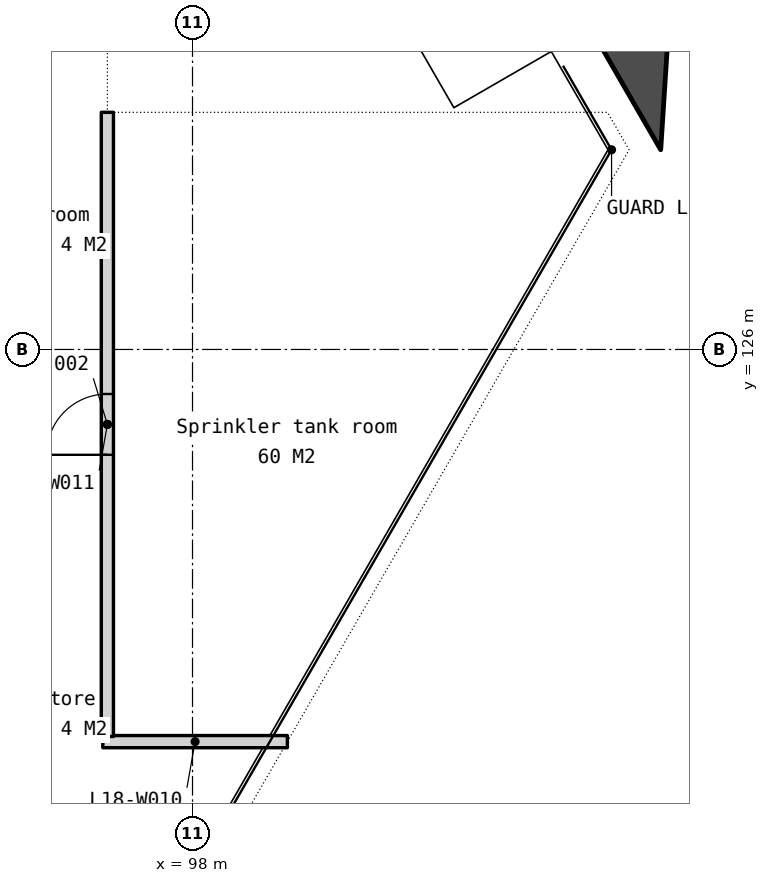
"""IFC4 building model, lengths in metres.
Left out: names, types, materials, properties, quantities, classifications, styles, units other than length and angle.
Written with IfcOpenShell. Run it as: python <this file> out.ifc"""

import sys

from ifc_helpers import new_model, si_unit, direction, frame, frame_2d, origin, place, context, subcontext, project, spatial, polyline, rectangle, outline, extrude, element, fill, save


model = new_model("IFC4")
c1 = context("Model", 3, precision=1e-05, world=origin(), true_north=direction((0.0, 1.0)))
c2 = subcontext(c1, "Body", "Model", "MODEL_VIEW")
j1 = project(units=[si_unit("LENGTHUNIT", "METRE"), si_unit("PLANEANGLEUNIT", "RADIAN")], contexts=[c1])
p1 = place(None, origin())
s1 = spatial("IfcSite", under=j1, at=p1, CompositionType="ELEMENT")
p2 = place(p1, origin())
s2 = spatial("IfcBuilding", under=s1, at=p2, CompositionType="ELEMENT")
p3 = place(p2, frame((0.0, 0.0, 77.0)))
s3 = spatial("IfcBuildingStorey", under=s2, at=p3, CompositionType="ELEMENT", Elevation=77.0)
p4 = place(p3, frame((0.0, 0.0, -0.25)))
e1 = element("IfcWall", 1, at=p4, inside=s3, PredefinedType="SOLIDWALL", context=c2, shape_type="SweptSolid", body=[
    extrude(outline(polyline([(105.7, 129.284), (106.011, 134.125), (102.4, 135.0), (105.7, 129.284)])), origin(), (0.0, 0.0, 1.0), 4.6),
])
p5 = place(p3, frame((96.525, 119.55, 0.0), z_axis=(0.0, 0.0, 1.0), x_axis=(1.0, 0.0, 0.0)))
e2 = element("IfcWall", 2, at=p5, inside=s3, PredefinedType="PARTITIONING", context=c2, shape_type="SweptSolid", body=[
    extrude(rectangle(XDim=3.035, YDim=0.2, at=frame_2d((1.518, 0.0))), origin(), (0.0, 0.0, 1.0), 4.35),
])
p6 = place(p3, frame((96.6, 119.635, 0.0), z_axis=(0.0, 0.0, 1.0), x_axis=(0.0, 1.0, 0.0)))
e3 = element("IfcWall", 3, at=p6, inside=s3, PredefinedType="PARTITIONING", context=c2, shape_type="SweptSolid", body=[
    extrude(rectangle(XDim=10.265, YDim=0.2, at=frame_2d((5.132, 0.0))), origin(), (0.0, 0.0, 1.0), 4.35),
])
p7 = place(p6, frame((4.633, 0.0, 0.0)))
e4 = element("IfcOpeningElement", 4, at=p7, cuts=e3, PredefinedType="OPENING", context=c2, shape_type="SweptSolid", body=[
    extrude(rectangle(XDim=1.0, YDim=2.1, at=frame_2d((0.5, 1.05))), frame((0.0, 0.11, 0.0), z_axis=(0.0, -1.0, 0.0), x_axis=(1.0, 0.0, 0.0)), (0.0, 0.0, 1.0), 0.22),
])
p8 = place(p7, origin())
e5 = element("IfcDoor", 5, at=p8, inside=s3, OperationType="SINGLE_SWING_LEFT", PredefinedType="DOOR", context=c2, shape_type="SweptSolid", body=[
    extrude(rectangle(XDim=1.0, YDim=2.1, at=frame_2d((0.5, 1.05))), frame((0.0, 0.025, 0.0), z_axis=(0.0, -1.0, 0.0), x_axis=(1.0, 0.0, 0.0)), (0.0, 0.0, 1.0), 0.05),
])
fill(e4, e5)
save(model, sys.argv[1])
